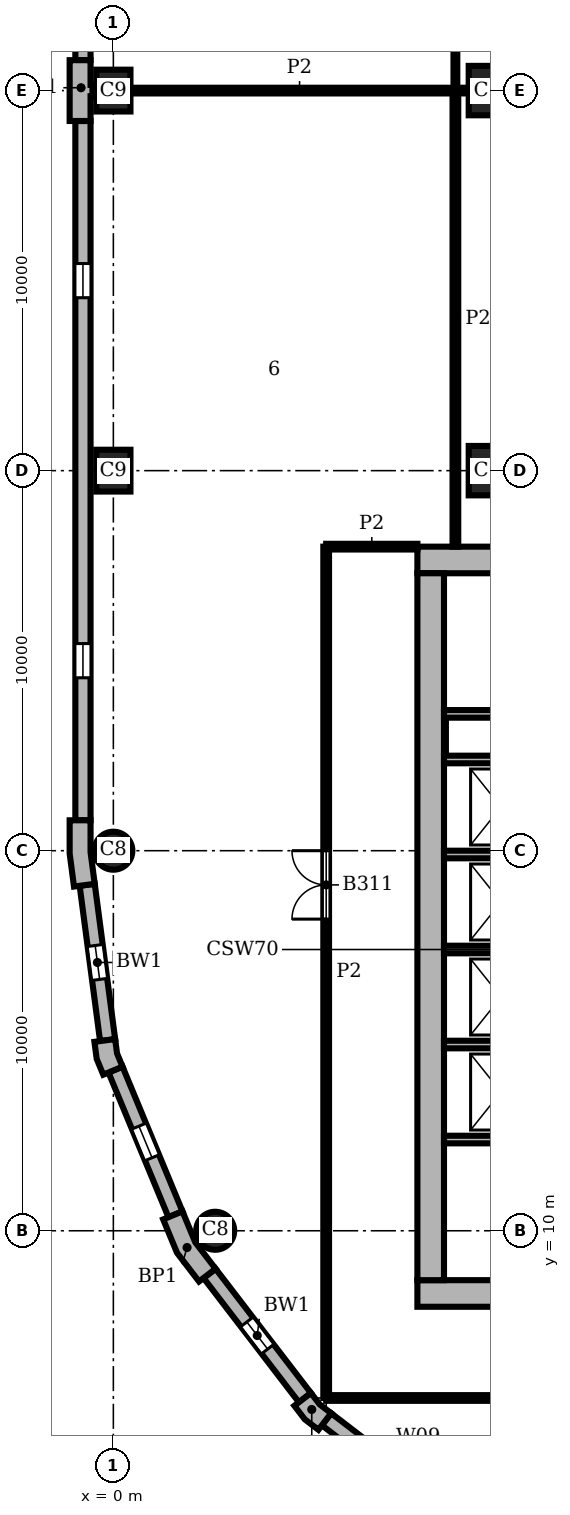
"""IFC4 building model, lengths in metres.
Left out: names, types, materials, properties, quantities, classifications, styles, units other than length and angle.
Written with IfcOpenShell. Run it as: python <this file> out.ifc"""

import sys

from ifc_helpers import new_model, si_unit, direction, frame, frame_2d, origin, origin_2d, place, context, subcontext, project, spatial, polyline, rectangle, circle, outline, extrude, element, fill, save


model = new_model("IFC4")
c1 = context("Model", 3, precision=1e-05, world=origin(), true_north=direction((0.0, 1.0)))
c2 = subcontext(c1, "Body", "Model", "MODEL_VIEW")
j1 = project(units=[si_unit("LENGTHUNIT", "METRE"), si_unit("PLANEANGLEUNIT", "RADIAN")], contexts=[c1])
p1 = place(None, origin())
s1 = spatial("IfcSite", under=j1, at=p1, CompositionType="ELEMENT")
p2 = place(p1, origin())
s2 = spatial("IfcBuilding", under=s1, at=p2, CompositionType="ELEMENT")
p3 = place(p2, frame((0.0, 0.0, 155.1)))
s3 = spatial("IfcBuildingStorey", under=s2, at=p3, CompositionType="ELEMENT", Elevation=155.1)
for number, where, z_axis, x_axis in (
    (1, (0.0, 40.0, 0.0), (0.0, 0.0, 1.0), (0.0, 1.0, 0.0)),
    (2, (0.0, 30.0, 0.0), (0.0, 0.0, 1.0), (0.0, 1.0, 0.0)),
):
    element("IfcColumn", number, at=place(p3, frame(where, z_axis=z_axis, x_axis=x_axis)), inside=s3, PredefinedType="COLUMN", context=c2, shape_type="SweptSolid", body=[
        extrude(rectangle(XDim=1.1, YDim=0.9, at=origin_2d()), origin(), (0.0, 0.0, 1.0), 3.9),
    ])
for number, where, z_axis, x_axis in (
    (3, (0.0, 20.0, 0.0), (0.0, 0.0, 1.0), (1.0, 0.0, 0.0)),
    (4, (2.679, 10.0, 0.0), (0.0, 0.0, 1.0), (1.0, 0.0, 0.0)),
):
    element("IfcColumn", number, at=place(p3, frame(where, z_axis=z_axis, x_axis=x_axis)), inside=s3, PredefinedType="COLUMN", context=c2, shape_type="SweptSolid", body=[
        extrude(circle(Radius=0.5, at=origin_2d()), origin(), (0.0, 0.0, 1.0), 3.9),
    ])
for number, where, z_axis, x_axis in (
    (5, (10.0, 30.0, 0.0), (0.0, 0.0, 1.0), (1.0, 0.0, 0.0)),
    (6, (10.0, 40.0, 0.0), (0.0, 0.0, 1.0), (1.0, 0.0, 0.0)),
):
    element("IfcColumn", number, at=place(p3, frame(where, z_axis=z_axis, x_axis=x_axis)), inside=s3, PredefinedType="COLUMN", context=c2, shape_type="SweptSolid", body=[
        extrude(rectangle(XDim=1.3, YDim=1.3, at=origin_2d()), origin(), (0.0, 0.0, 1.0), 3.9),
    ])
for number, where, z_axis, x_axis in (
    (7, (8.0, 8.35, 0.0), (0.0, 0.0, 1.0), (1.0, 0.0, 0.0)),
    (8, (28.0, 27.65, 0.0), (0.0, 0.0, 1.0), (-1.0, 0.0, 0.0)),
):
    element("IfcWall", number, at=place(p3, frame(where, z_axis=z_axis, x_axis=x_axis)), inside=s3, PredefinedType="SHEAR", context=c2, shape_type="SweptSolid", body=[
        extrude(rectangle(XDim=20.0, YDim=0.7, at=frame_2d((10.0, 0.0))), origin(), (0.0, 0.0, 1.0), 3.9),
    ])
p4 = place(p3, frame((8.35, 27.3, 0.0), z_axis=(0.0, 0.0, 1.0), x_axis=(0.0, -1.0, 0.0)))
e9 = element("IfcWall", 9, at=p4, inside=s3, PredefinedType="SHEAR", context=c2, shape_type="SweptSolid", body=[
    extrude(rectangle(XDim=18.6, YDim=0.7, at=frame_2d((9.3, 0.0))), origin(), (0.0, 0.0, 1.0), 3.9),
])
p5 = place(p3, origin())
e10 = element("IfcWall", 10, at=p5, inside=s3, PredefinedType="SOLIDWALL", context=c2, shape_type="SweptSolid", body=[
    extrude(outline(polyline([(-0.6, 39.2), (-0.6, 39.85), (-0.55, 39.85), (-0.55, 40.15), (-0.6, 40.15), (-0.6, 40.8), (-1.0, 40.8), (-1.15, 40.8), (-1.15, 40.0), (-1.15, 39.2), (-1.0, 39.2), (-0.6, 39.2)])), origin(), (0.0, 0.0, 1.0), 3.9),
])
e11 = element("IfcWall", 11, at=p5, inside=s3, PredefinedType="SOLIDWALL", context=c2, shape_type="SweptSolid", body=[
    extrude(outline(polyline([(-1.0, 20.8), (-1.15, 20.8), (-1.15, 19.925), (-1.036, 19.057), (-0.887, 19.076), (-0.49, 19.128), (-0.6, 19.961), (-0.6, 20.8), (-1.0, 20.8)])), origin(), (0.0, 0.0, 1.0), 3.9),
])
e12 = element("IfcWall", 12, at=p5, inside=s3, PredefinedType="SOLIDWALL", context=c2, shape_type="SweptSolid", body=[
    extrude(outline(polyline([(-0.349, 14.99), (-0.498, 14.971), (-0.439, 14.523), (-0.266, 14.106), (-0.128, 14.164), (0.242, 14.317), (0.097, 14.667), (0.047, 15.043), (-0.349, 14.99)])), origin(), (0.0, 0.0, 1.0), 3.9),
])
e13 = element("IfcWall", 13, at=p5, inside=s3, PredefinedType="SOLIDWALL", context=c2, shape_type="SweptSolid", body=[
    extrude(outline(polyline([(1.449, 10.356), (1.311, 10.299), (1.675, 9.42), (2.254, 8.665), (2.373, 8.757), (2.69, 9.0), (2.155, 9.698), (1.819, 10.51), (1.449, 10.356)])), origin(), (0.0, 0.0, 1.0), 3.9),
])
e14 = element("IfcWall", 14, at=p5, inside=s3, PredefinedType="SOLIDWALL", context=c2, shape_type="SweptSolid", body=[
    extrude(outline(polyline([(4.882, 5.487), (4.763, 5.396), (5.038, 5.038), (5.396, 4.763), (5.487, 4.882), (5.731, 5.199), (5.43, 5.43), (5.199, 5.731), (4.882, 5.487)])), origin(), (0.0, 0.0, 1.0), 3.9),
])
p6 = place(p3, frame((-0.8, 59.2, 0.0), z_axis=(0.0, 0.0, 1.0), x_axis=(0.0, -1.0, 0.0)))
e15 = element("IfcWall", 15, at=p6, inside=s3, PredefinedType="SOLIDWALL", context=c2, shape_type="SweptSolid", body=[
    extrude(rectangle(XDim=18.4, YDim=0.4, at=frame_2d((9.2, 0.0))), origin(), (0.0, 0.0, 1.0), 3.9),
])
p7 = place(p6, frame((3.75, 0.0, 0.9)))
e16 = element("IfcOpeningElement", 16, at=p7, cuts=e15, PredefinedType="OPENING", context=c2, shape_type="SweptSolid", body=[
    extrude(rectangle(XDim=0.9, YDim=2.35, at=frame_2d((0.45, 1.175))), frame((0.0, 0.21, 0.0), z_axis=(0.0, -1.0, 0.0), x_axis=(1.0, 0.0, 0.0)), (0.0, 0.0, 1.0), 0.42),
])
p8 = place(p6, frame((13.75, 0.0, 0.9)))
e17 = element("IfcOpeningElement", 17, at=p8, cuts=e15, PredefinedType="OPENING", context=c2, shape_type="SweptSolid", body=[
    extrude(rectangle(XDim=0.9, YDim=2.35, at=frame_2d((0.45, 1.175))), frame((0.0, 0.21, 0.0), z_axis=(0.0, -1.0, 0.0), x_axis=(1.0, 0.0, 0.0)), (0.0, 0.0, 1.0), 0.42),
])
p9 = place(p3, frame((-0.8, 39.2, 0.0), z_axis=(0.0, 0.0, 1.0), x_axis=(0.0, -1.0, 0.0)))
e18 = element("IfcWall", 18, at=p9, inside=s3, PredefinedType="SOLIDWALL", context=c2, shape_type="SweptSolid", body=[
    extrude(rectangle(XDim=18.4, YDim=0.4, at=frame_2d((9.2, 0.0))), origin(), (0.0, 0.0, 1.0), 3.9),
])
p10 = place(p9, frame((3.75, 0.0, 0.9)))
e19 = element("IfcOpeningElement", 19, at=p10, cuts=e18, PredefinedType="OPENING", context=c2, shape_type="SweptSolid", body=[
    extrude(rectangle(XDim=0.9, YDim=2.35, at=frame_2d((0.45, 1.175))), frame((0.0, 0.21, 0.0), z_axis=(0.0, -1.0, 0.0), x_axis=(1.0, 0.0, 0.0)), (0.0, 0.0, 1.0), 0.42),
])
p11 = place(p9, frame((13.75, 0.0, 0.9)))
e20 = element("IfcOpeningElement", 20, at=p11, cuts=e18, PredefinedType="OPENING", context=c2, shape_type="SweptSolid", body=[
    extrude(rectangle(XDim=0.9, YDim=2.35, at=frame_2d((0.45, 1.175))), frame((0.0, 0.21, 0.0), z_axis=(0.0, -1.0, 0.0), x_axis=(1.0, 0.0, 0.0)), (0.0, 0.0, 1.0), 0.42),
])
p12 = place(p3, frame((-0.689, 19.102, 0.0), z_axis=(0.0, 0.0, 1.0), x_axis=(0.130514280502, -0.991446429508, 0.0)))
e21 = element("IfcWall", 21, at=p12, inside=s3, PredefinedType="SOLIDWALL", context=c2, shape_type="SweptSolid", body=[
    extrude(rectangle(XDim=4.121, YDim=0.4, at=frame_2d((2.061, 0.0))), origin(), (0.0, 0.0, 1.0), 3.9),
])
p13 = place(p12, frame((1.611, 0.0, 0.9)))
e22 = element("IfcOpeningElement", 22, at=p13, cuts=e21, PredefinedType="OPENING", context=c2, shape_type="SweptSolid", body=[
    extrude(rectangle(XDim=0.9, YDim=2.35, at=frame_2d((0.45, 1.175))), frame((0.0, 0.21, 0.0), z_axis=(0.0, -1.0, 0.0), x_axis=(1.0, 0.0, 0.0)), (0.0, 0.0, 1.0), 0.42),
])
p14 = place(p3, frame((0.057, 14.24, 0.0), z_axis=(0.0, 0.0, 1.0), x_axis=(0.382721546029, -0.923863744394, 0.0)))
e23 = element("IfcWall", 23, at=p14, inside=s3, PredefinedType="SOLIDWALL", context=c2, shape_type="SweptSolid", body=[
    extrude(rectangle(XDim=4.121, YDim=0.4, at=frame_2d((2.061, 0.0))), origin(), (0.0, 0.0, 1.0), 3.9),
])
p15 = place(p14, frame((1.611, 0.0, 0.9)))
e24 = element("IfcOpeningElement", 24, at=p15, cuts=e23, PredefinedType="OPENING", context=c2, shape_type="SweptSolid", body=[
    extrude(rectangle(XDim=0.9, YDim=2.35, at=frame_2d((0.45, 1.175))), frame((0.0, 0.21, 0.0), z_axis=(0.0, -1.0, 0.0), x_axis=(1.0, 0.0, 0.0)), (0.0, 0.0, 1.0), 0.42),
])
p16 = place(p3, frame((2.532, 8.878, 0.0), z_axis=(0.0, 0.0, 1.0), x_axis=(0.608759824817, -0.793354571229, 0.0)))
e25 = element("IfcWall", 25, at=p16, inside=s3, PredefinedType="SOLIDWALL", context=c2, shape_type="SweptSolid", body=[
    extrude(rectangle(XDim=4.121, YDim=0.4, at=frame_2d((2.061, 0.0))), origin(), (0.0, 0.0, 1.0), 3.9),
])
p17 = place(p16, frame((1.611, 0.0, 0.9)))
e26 = element("IfcOpeningElement", 26, at=p17, cuts=e25, PredefinedType="OPENING", context=c2, shape_type="SweptSolid", body=[
    extrude(rectangle(XDim=0.9, YDim=2.35, at=frame_2d((0.45, 1.175))), frame((0.0, 0.21, 0.0), z_axis=(0.0, -1.0, 0.0), x_axis=(1.0, 0.0, 0.0)), (0.0, 0.0, 1.0), 0.42),
])
p18 = place(p3, frame((5.609, 5.041, 0.0), z_axis=(0.0, 0.0, 1.0), x_axis=(0.793354571229, -0.608759824817, 0.0)))
e27 = element("IfcWall", 27, at=p18, inside=s3, PredefinedType="SOLIDWALL", context=c2, shape_type="SweptSolid", body=[
    extrude(rectangle(XDim=4.121, YDim=0.4, at=frame_2d((2.061, 0.0))), origin(), (0.0, 0.0, 1.0), 3.9),
])
p19 = place(p18, frame((1.611, 0.0, 0.9)))
e28 = element("IfcOpeningElement", 28, at=p19, cuts=e27, PredefinedType="OPENING", context=c2, shape_type="SweptSolid", body=[
    extrude(rectangle(XDim=0.9, YDim=2.35, at=frame_2d((0.45, 1.175))), frame((0.0, 0.21, 0.0), z_axis=(0.0, -1.0, 0.0), x_axis=(1.0, 0.0, 0.0)), (0.0, 0.0, 1.0), 0.42),
])
p20 = place(p3, frame((8.7, 12.4, 0.0), z_axis=(0.0, 0.0, 1.0), x_axis=(1.0, 0.0, 0.0)))
e29 = element("IfcWall", 29, at=p20, inside=s3, PredefinedType="SHEAR", context=c2, shape_type="SweptSolid", body=[
    extrude(rectangle(XDim=5.1, YDim=0.2, at=frame_2d((2.55, 0.0))), origin(), (0.0, 0.0, 1.0), 3.58),
])
for number, where, z_axis, x_axis in (
    (30, (8.7, 14.9, 0.0), (0.0, 0.0, 1.0), (1.0, 0.0, 0.0)),
    (31, (8.7, 17.4, 0.0), (0.0, 0.0, 1.0), (1.0, 0.0, 0.0)),
    (32, (8.7, 19.9, 0.0), (0.0, 0.0, 1.0), (1.0, 0.0, 0.0)),
    (33, (8.7, 22.4, 0.0), (0.0, 0.0, 1.0), (1.0, 0.0, 0.0)),
):
    element("IfcWall", number, at=place(p3, frame(where, z_axis=z_axis, x_axis=x_axis)), inside=s3, PredefinedType="SHEAR", context=c2, shape_type="SweptSolid", body=[
        extrude(rectangle(XDim=3.0, YDim=0.2, at=frame_2d((1.5, 0.0))), origin(), (0.0, 0.0, 1.0), 3.58),
    ])
p21 = place(p3, frame((8.7, 23.6, 0.0), z_axis=(0.0, 0.0, 1.0), x_axis=(1.0, 0.0, 0.0)))
e34 = element("IfcWall", 34, at=p21, inside=s3, PredefinedType="SHEAR", context=c2, shape_type="SweptSolid", body=[
    extrude(rectangle(XDim=5.1, YDim=0.2, at=frame_2d((2.55, 0.0))), origin(), (0.0, 0.0, 1.0), 3.58),
])
p22 = place(p3, frame((9.0, 40.0, 0.0), z_axis=(0.0, 0.0, 1.0), x_axis=(0.0, 1.0, 0.0)))
e35 = element("IfcWall", 35, at=p22, inside=s3, PredefinedType="PARTITIONING", context=c2, shape_type="SweptSolid", body=[
    extrude(rectangle(XDim=2.5, YDim=0.1, at=frame_2d((1.25, 0.0))), origin(), (0.0, 0.0, 1.0), 3.58),
])
p23 = place(p3, frame((5.6, 5.6, 0.0), z_axis=(0.0, 0.0, 1.0), x_axis=(0.0, 1.0, 0.0)))
e36 = element("IfcWall", 36, at=p23, inside=s3, PredefinedType="PARTITIONING", context=c2, shape_type="SweptSolid", body=[
    extrude(rectangle(XDim=22.4, YDim=0.15, at=frame_2d((11.2, 0.0))), origin(), (0.0, 0.0, 1.0), 3.58),
])
p24 = place(p23, frame((12.6, 0.0, 0.0)))
e37 = element("IfcOpeningElement", 37, at=p24, cuts=e36, PredefinedType="OPENING", context=c2, shape_type="SweptSolid", body=[
    extrude(rectangle(XDim=1.8, YDim=2.1, at=frame_2d((0.9, 1.05))), frame((0.0, 0.085, 0.0), z_axis=(0.0, -1.0, 0.0), x_axis=(1.0, 0.0, 0.0)), (0.0, 0.0, 1.0), 0.17),
])
p25 = place(p3, frame((9.0, 28.0, 0.0), z_axis=(0.0, 0.0, 1.0), x_axis=(0.0, 1.0, 0.0)))
e38 = element("IfcWall", 38, at=p25, inside=s3, PredefinedType="PARTITIONING", context=c2, shape_type="SweptSolid", body=[
    extrude(rectangle(XDim=12.0, YDim=0.15, at=frame_2d((6.0, 0.0))), origin(), (0.0, 0.0, 1.0), 3.58),
])
p26 = place(p3, frame((5.6, 5.6, 0.0), z_axis=(0.0, 0.0, 1.0), x_axis=(1.0, 0.0, 0.0)))
e39 = element("IfcWall", 39, at=p26, inside=s3, PredefinedType="PARTITIONING", context=c2, shape_type="SweptSolid", body=[
    extrude(rectangle(XDim=25.4, YDim=0.15, at=frame_2d((12.7, 0.0))), origin(), (0.0, 0.0, 1.0), 3.58),
])
p27 = place(p26, frame((5.6, 0.0, 0.0)))
e40 = element("IfcOpeningElement", 40, at=p27, cuts=e39, PredefinedType="OPENING", context=c2, shape_type="SweptSolid", body=[
    extrude(rectangle(XDim=0.8, YDim=2.1, at=frame_2d((0.4, 1.05))), frame((0.0, 0.085, 0.0), z_axis=(0.0, -1.0, 0.0), x_axis=(1.0, 0.0, 0.0)), (0.0, 0.0, 1.0), 0.17),
])
p28 = place(p26, frame((11.0, 0.0, 0.0)))
e41 = element("IfcOpeningElement", 41, at=p28, cuts=e39, PredefinedType="OPENING", context=c2, shape_type="SweptSolid", body=[
    extrude(rectangle(XDim=1.1, YDim=2.1, at=frame_2d((0.55, 1.05))), frame((0.0, 0.085, 0.0), z_axis=(0.0, -1.0, 0.0), x_axis=(1.0, 0.0, 0.0)), (0.0, 0.0, 1.0), 0.17),
])
p29 = place(p26, frame((19.0, 0.0, 0.0)))
e42 = element("IfcOpeningElement", 42, at=p29, cuts=e39, PredefinedType="OPENING", context=c2, shape_type="SweptSolid", body=[
    extrude(rectangle(XDim=1.0, YDim=2.1, at=frame_2d((0.5, 1.05))), frame((0.0, 0.085, 0.0), z_axis=(0.0, -1.0, 0.0), x_axis=(1.0, 0.0, 0.0)), (0.0, 0.0, 1.0), 0.17),
])
p30 = place(p3, frame((5.6, 28.0, 0.0), z_axis=(0.0, 0.0, 1.0), x_axis=(1.0, 0.0, 0.0)))
e43 = element("IfcWall", 43, at=p30, inside=s3, PredefinedType="PARTITIONING", context=c2, shape_type="SweptSolid", body=[
    extrude(rectangle(XDim=2.4, YDim=0.15, at=frame_2d((1.2, 0.0))), origin(), (0.0, 0.0, 1.0), 3.58),
])
p31 = place(p3, frame((0.45, 40.0, 0.0), z_axis=(0.0, 0.0, 1.0), x_axis=(1.0, 0.0, 0.0)))
e44 = element("IfcWall", 44, at=p31, inside=s3, PredefinedType="PARTITIONING", context=c2, shape_type="SweptSolid", body=[
    extrude(rectangle(XDim=8.9, YDim=0.15, at=frame_2d((4.45, 0.0))), origin(), (0.0, 0.0, 1.0), 3.58),
])
p32 = place(p10, origin())
e45 = element("IfcWindow", 45, at=p32, inside=s3, PartitioningType="SINGLE_PANEL", PredefinedType="WINDOW", context=c2, shape_type="SweptSolid", body=[
    extrude(rectangle(XDim=0.9, YDim=2.35, at=frame_2d((0.45, 1.175))), frame((0.0, 0.16, 0.0), z_axis=(0.0, -1.0, 0.0), x_axis=(1.0, 0.0, 0.0)), (0.0, 0.0, 1.0), 0.06),
])
fill(e19, e45)
p33 = place(p11, origin())
e46 = element("IfcWindow", 46, at=p33, inside=s3, PartitioningType="SINGLE_PANEL", PredefinedType="WINDOW", context=c2, shape_type="SweptSolid", body=[
    extrude(rectangle(XDim=0.9, YDim=2.35, at=frame_2d((0.45, 1.175))), frame((0.0, 0.16, 0.0), z_axis=(0.0, -1.0, 0.0), x_axis=(1.0, 0.0, 0.0)), (0.0, 0.0, 1.0), 0.06),
])
fill(e20, e46)
p34 = place(p13, origin())
e47 = element("IfcWindow", 47, at=p34, inside=s3, PartitioningType="SINGLE_PANEL", PredefinedType="WINDOW", context=c2, shape_type="SweptSolid", body=[
    extrude(rectangle(XDim=0.9, YDim=2.35, at=frame_2d((0.45, 1.175))), frame((0.0, 0.16, 0.0), z_axis=(0.0, -1.0, 0.0), x_axis=(1.0, 0.0, 0.0)), (0.0, 0.0, 1.0), 0.06),
])
fill(e22, e47)
p35 = place(p15, origin())
e48 = element("IfcWindow", 48, at=p35, inside=s3, PartitioningType="SINGLE_PANEL", PredefinedType="WINDOW", context=c2, shape_type="SweptSolid", body=[
    extrude(rectangle(XDim=0.9, YDim=2.35, at=frame_2d((0.45, 1.175))), frame((0.0, 0.16, 0.0), z_axis=(0.0, -1.0, 0.0), x_axis=(1.0, 0.0, 0.0)), (0.0, 0.0, 1.0), 0.06),
])
fill(e24, e48)
p36 = place(p17, origin())
e49 = element("IfcWindow", 49, at=p36, inside=s3, PartitioningType="SINGLE_PANEL", PredefinedType="WINDOW", context=c2, shape_type="SweptSolid", body=[
    extrude(rectangle(XDim=0.9, YDim=2.35, at=frame_2d((0.45, 1.175))), frame((0.0, 0.16, 0.0), z_axis=(0.0, -1.0, 0.0), x_axis=(1.0, 0.0, 0.0)), (0.0, 0.0, 1.0), 0.06),
])
fill(e26, e49)
p37 = place(p24, origin())
e50 = element("IfcDoor", 50, at=p37, inside=s3, OperationType="DOUBLE_DOOR_SINGLE_SWING", PredefinedType="DOOR", context=c2, shape_type="SweptSolid", body=[
    extrude(rectangle(XDim=1.8, YDim=2.1, at=frame_2d((0.9, 1.05))), frame((0.0, 0.025, 0.0), z_axis=(0.0, -1.0, 0.0), x_axis=(1.0, 0.0, 0.0)), (0.0, 0.0, 1.0), 0.05),
])
fill(e37, e50)
save(model, sys.argv[1])
